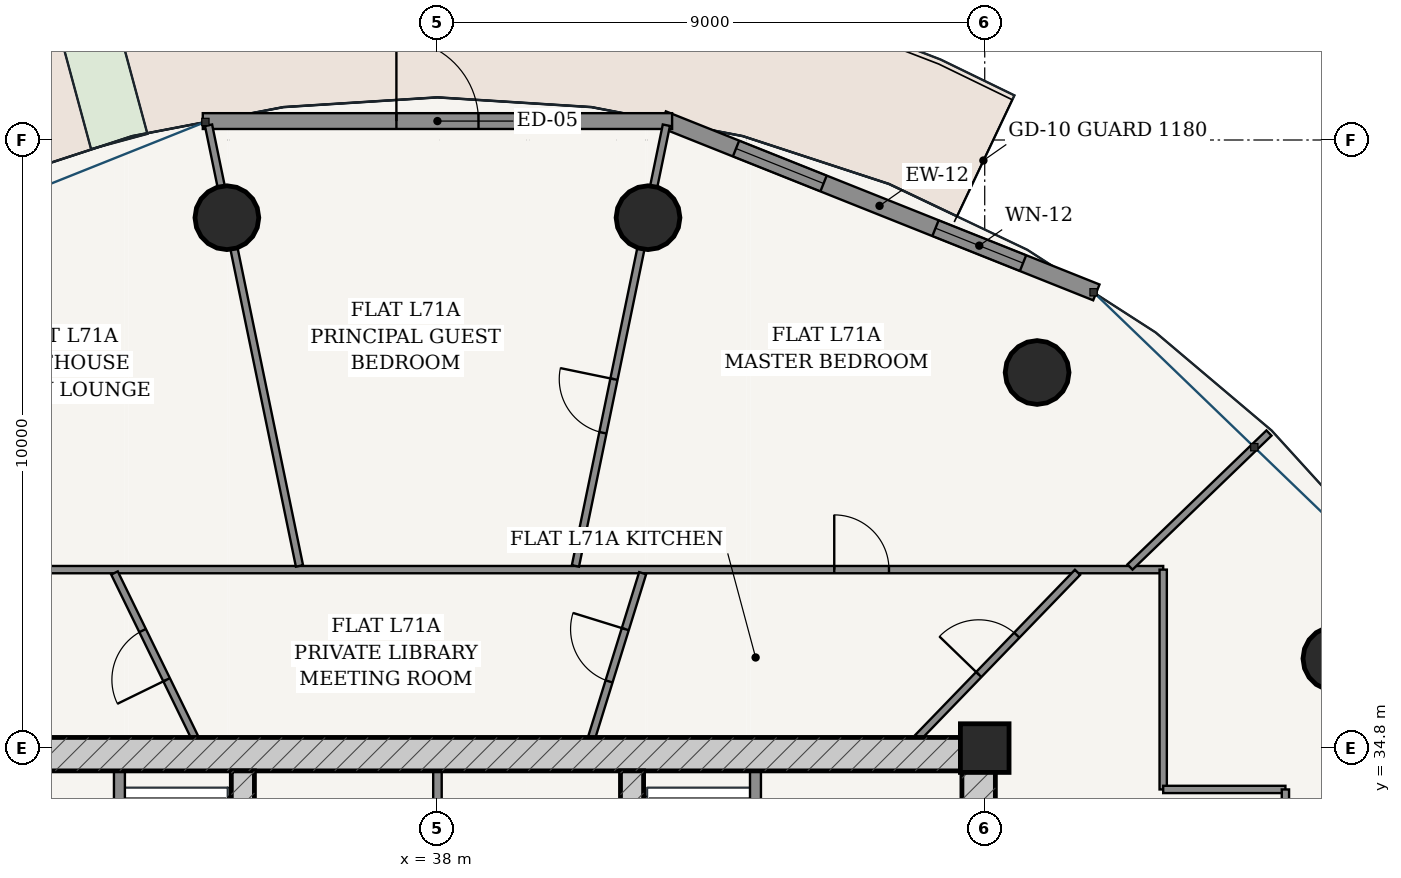
"""IFC4 building model, lengths in metres.
Left out: names, types, materials, properties, quantities, classifications, styles, units other than length and angle.
Written with IfcOpenShell. Run it as: python <this file> out.ifc"""

import sys

from ifc_helpers import new_model, si_unit, direction, frame, frame_2d, origin, origin_2d, place, context, subcontext, project, spatial, rectangle, hollow_circle, extrude, source, transform, mapped, element, fill, save


model = new_model("IFC4")
c1 = context("Model", 3, precision=1e-05, world=origin(), true_north=direction((-0.2419218956, 0.970295726276)))
c2 = subcontext(c1, "Body", "Model", "MODEL_VIEW")
j1 = project(units=[si_unit("LENGTHUNIT", "METRE"), si_unit("PLANEANGLEUNIT", "RADIAN")], contexts=[c1])
p1 = place(None, origin())
s1 = spatial("IfcSite", under=j1, at=p1, CompositionType="ELEMENT")
p2 = place(p1, origin())
s2 = spatial("IfcBuilding", under=s1, at=p2, CompositionType="ELEMENT")
p3 = place(p2, frame((0.0, 0.0, 270.7)))
s3 = spatial("IfcBuildingStorey", under=s2, at=p3, CompositionType="ELEMENT", Elevation=270.7)
p4 = place(p3, frame((47.0, 34.8, 0.0), z_axis=(0.0, 0.0, 1.0), x_axis=(1.0, 0.0, 0.0)))
e1 = element("IfcColumn", 1, at=p4, inside=s3, PredefinedType="COLUMN", context=c2, shape_type="SweptSolid", body=[
    extrude(rectangle(XDim=0.8, YDim=0.8, at=origin_2d()), origin(), (0.0, 0.0, 1.0), 3.75),
])
p5 = place(p3, frame((28.825, 34.7, 0.0), z_axis=(0.0, 0.0, 1.0), x_axis=(1.0, 0.0, 0.0)))
e2 = element("IfcWall", 2, at=p5, inside=s3, PredefinedType="SHEAR", context=c2, shape_type="SweptSolid", body=[
    extrude(rectangle(XDim=18.35, YDim=0.55, at=frame_2d((9.175, 0.0))), origin(), (0.0, 0.0, 1.0), 3.49),
])
p6 = place(p3, frame((46.9, 19.175, 0.0), z_axis=(0.0, 0.0, 1.0), x_axis=(0.0, 1.0, 0.0)))
e3 = element("IfcWall", 3, at=p6, inside=s3, PredefinedType="SHEAR", context=c2, shape_type="SweptSolid", body=[
    extrude(rectangle(XDim=15.25, YDim=0.55, at=frame_2d((7.625, 0.0))), origin(), (0.0, 0.0, 1.0), 3.49),
])
p7 = place(p6, frame((9.875, 0.0, 0.0)))
e4 = element("IfcOpeningElement", 4, at=p7, cuts=e3, PredefinedType="OPENING", context=c2, shape_type="SweptSolid", body=[
    extrude(rectangle(XDim=1.5, YDim=2.2, at=frame_2d((0.75, 1.1))), frame((0.0, 0.285, 0.0), z_axis=(0.0, -1.0, 0.0), x_axis=(1.0, 0.0, 0.0)), (0.0, 0.0, 1.0), 0.57),
])
p8 = place(p3, frame((34.8, 19.175, 0.0), z_axis=(0.0, 0.0, 1.0), x_axis=(0.0, 1.0, 0.0)))
e5 = element("IfcWall", 5, at=p8, inside=s3, PredefinedType="SHEAR", context=c2, shape_type="SweptSolid", body=[
    extrude(rectangle(XDim=15.25, YDim=0.38, at=frame_2d((7.625, 0.0))), origin(), (0.0, 0.0, 1.0), 3.49),
])
p9 = place(p8, frame((7.8, 0.0, 0.0)))
e6 = element("IfcOpeningElement", 6, at=p9, cuts=e5, PredefinedType="OPENING", context=c2, shape_type="SweptSolid", body=[
    extrude(rectangle(XDim=1.05, YDim=2.15, at=frame_2d((0.525, 1.075))), frame((0.0, 0.2, 0.0), z_axis=(0.0, -1.0, 0.0), x_axis=(1.0, 0.0, 0.0)), (0.0, 0.0, 1.0), 0.4),
])
p10 = place(p3, frame((41.2, 19.175, 0.0), z_axis=(0.0, 0.0, 1.0), x_axis=(0.0, 1.0, 0.0)))
e7 = element("IfcWall", 7, at=p10, inside=s3, PredefinedType="SHEAR", context=c2, shape_type="SweptSolid", body=[
    extrude(rectangle(XDim=15.25, YDim=0.38, at=frame_2d((7.625, 0.0))), origin(), (0.0, 0.0, 1.0), 3.49),
])
p11 = place(p10, frame((7.8, 0.0, 0.0)))
e8 = element("IfcOpeningElement", 8, at=p11, cuts=e7, PredefinedType="OPENING", context=c2, shape_type="SweptSolid", body=[
    extrude(rectangle(XDim=1.05, YDim=2.15, at=frame_2d((0.525, 1.075))), frame((0.0, 0.2, 0.0), z_axis=(0.0, -1.0, 0.0), x_axis=(1.0, 0.0, 0.0)), (0.0, 0.0, 1.0), 0.4),
])
for number, where, z_axis, x_axis in (
    (9, (52.759, 36.272, 0.0), (0.0, 0.0, 1.0), (1.0, 0.0, 0.0)),
    (10, (47.861, 40.977, 0.0), (0.0, 0.0, 1.0), (1.0, 0.0, 0.0)),
    (11, (41.463, 43.522, 0.0), (0.0, 0.0, 1.0), (1.0, 0.0, 0.0)),
    (12, (34.537, 43.522, 0.0), (0.0, 0.0, 1.0), (1.0, 0.0, 0.0)),
):
    element("IfcColumn", number, at=place(p3, frame(where, z_axis=z_axis, x_axis=x_axis)), inside=s3, PredefinedType="COLUMN", context=c2, shape_type="SweptSolid", body=[
        extrude(hollow_circle(Radius=0.525, WallThickness=0.035, at=origin_2d()), origin(), (0.0, 0.0, 1.0), 3.75),
    ])
p12 = place(p3, frame((48.836, 42.294, 0.0), z_axis=(0.0, 0.0, 1.0), x_axis=(-0.928724272392, 0.370771123296, 0.0)))
e13 = element("IfcWall", 13, at=p12, inside=s3, PredefinedType="SOLIDWALL", context=c2, shape_type="SweptSolid", body=[
    extrude(rectangle(XDim=7.678, YDim=0.28, at=frame_2d((3.839, 0.0))), origin(), (0.0, 0.0, 1.0), 3.49),
])
p13 = place(p12, frame((1.298, 0.0, 0.85)))
e14 = element("IfcOpeningElement", 14, at=p13, cuts=e13, PredefinedType="OPENING", context=c2, shape_type="SweptSolid", body=[
    extrude(rectangle(XDim=1.55, YDim=1.95, at=frame_2d((0.775, 0.975))), frame((0.0, 0.15, 0.0), z_axis=(0.0, -1.0, 0.0), x_axis=(1.0, 0.0, 0.0)), (0.0, 0.0, 1.0), 0.3),
])
p14 = place(p12, frame((4.83, 0.0, 0.85)))
e15 = element("IfcOpeningElement", 15, at=p14, cuts=e13, PredefinedType="OPENING", context=c2, shape_type="SweptSolid", body=[
    extrude(rectangle(XDim=1.55, YDim=1.95, at=frame_2d((0.775, 0.975))), frame((0.0, 0.15, 0.0), z_axis=(0.0, -1.0, 0.0), x_axis=(1.0, 0.0, 0.0)), (0.0, 0.0, 1.0), 0.3),
])
p15 = place(p3, frame((41.859, 45.111, 0.0), z_axis=(0.0, 0.0, 1.0), x_axis=(-1.0, 0.0, 0.0)))
e16 = element("IfcWall", 16, at=p15, inside=s3, PredefinedType="SOLIDWALL", context=c2, shape_type="SweptSolid", body=[
    extrude(rectangle(XDim=7.718, YDim=0.26, at=frame_2d((3.859, 0.0))), origin(), (0.0, 0.0, 1.0), 3.49),
])
p16 = place(p15, frame((3.184, 0.0, 0.0)))
e17 = element("IfcOpeningElement", 17, at=p16, cuts=e16, PredefinedType="OPENING", context=c2, shape_type="SweptSolid", body=[
    extrude(rectangle(XDim=1.35, YDim=2.2, at=frame_2d((0.675, 1.1))), frame((0.0, 0.14, 0.0), z_axis=(0.0, -1.0, 0.0), x_axis=(1.0, 0.0, 0.0)), (0.0, 0.0, 1.0), 0.28),
])
p17 = place(p3, frame((32.77, 28.52, 0.0), z_axis=(0.0, 0.0, 1.0), x_axis=(0.0, 1.0, 0.0)))
e18 = element("IfcWall", 18, at=p17, inside=s3, PredefinedType="PARTITIONING", context=c2, shape_type="SweptSolid", body=[
    extrude(rectangle(XDim=5.905, YDim=0.18, at=frame_2d((2.953, 0.0))), origin(), (0.0, 0.0, 1.0), 3.49),
])
p18 = place(p17, frame((3.655, 0.0, 0.0)))
e19 = element("IfcOpeningElement", 19, at=p18, cuts=e18, PredefinedType="OPENING", context=c2, shape_type="SweptSolid", body=[
    extrude(rectangle(XDim=1.15, YDim=2.2, at=frame_2d((0.575, 1.1))), frame((0.0, 0.1, 0.0), z_axis=(0.0, -1.0, 0.0), x_axis=(1.0, 0.0, 0.0)), (0.0, 0.0, 1.0), 0.2),
])
p19 = place(p17, frame((0.73, 0.0, 0.0)))
e20 = element("IfcOpeningElement", 20, at=p19, cuts=e18, PredefinedType="OPENING", context=c2, shape_type="SweptSolid", body=[
    extrude(rectangle(XDim=1.2, YDim=2.25, at=frame_2d((0.6, 1.125))), frame((0.0, 0.1, 0.0), z_axis=(0.0, -1.0, 0.0), x_axis=(1.0, 0.0, 0.0)), (0.0, 0.0, 1.0), 0.2),
])
p20 = place(p3, frame((43.23, 28.52, 0.0), z_axis=(0.0, 0.0, 1.0), x_axis=(0.0, 1.0, 0.0)))
e21 = element("IfcWall", 21, at=p20, inside=s3, PredefinedType="PARTITIONING", context=c2, shape_type="SweptSolid", body=[
    extrude(rectangle(XDim=5.905, YDim=0.18, at=frame_2d((2.953, 0.0))), origin(), (0.0, 0.0, 1.0), 3.49),
])
p21 = place(p20, frame((0.905, 0.0, 0.0)))
e22 = element("IfcOpeningElement", 22, at=p21, cuts=e21, PredefinedType="OPENING", context=c2, shape_type="SweptSolid", body=[
    extrude(rectangle(XDim=0.85, YDim=2.1, at=frame_2d((0.425, 1.05))), frame((0.0, 0.1, 0.0), z_axis=(0.0, -1.0, 0.0), x_axis=(1.0, 0.0, 0.0)), (0.0, 0.0, 1.0), 0.2),
])
p22 = place(p20, frame((3.655, 0.0, 0.0)))
e23 = element("IfcOpeningElement", 23, at=p22, cuts=e21, PredefinedType="OPENING", context=c2, shape_type="SweptSolid", body=[
    extrude(rectangle(XDim=1.15, YDim=2.2, at=frame_2d((0.575, 1.1))), frame((0.0, 0.1, 0.0), z_axis=(0.0, -1.0, 0.0), x_axis=(1.0, 0.0, 0.0)), (0.0, 0.0, 1.0), 0.2),
])
p23 = place(p3, frame((38.0, 28.56, 0.0), z_axis=(0.0, 0.0, 1.0), x_axis=(0.0, 1.0, 0.0)))
e24 = element("IfcWall", 24, at=p23, inside=s3, PredefinedType="PARTITIONING", context=c2, shape_type="SweptSolid", body=[
    extrude(rectangle(XDim=5.865, YDim=0.14, at=frame_2d((2.933, 0.0))), origin(), (0.0, 0.0, 1.0), 3.49),
])
p24 = place(p3, frame((26.065, 37.735, 0.0), z_axis=(0.0, 0.0, 1.0), x_axis=(1.0, 0.0, 0.0)))
e25 = element("IfcWall", 25, at=p24, inside=s3, PredefinedType="PARTITIONING", context=c2, shape_type="SweptSolid", body=[
    extrude(rectangle(XDim=23.87, YDim=0.12, at=frame_2d((11.935, 0.0))), origin(), (0.0, 0.0, 1.0), 3.015),
])
p25 = place(p24, frame((18.46, 0.0, 0.0)))
e26 = element("IfcOpeningElement", 26, at=p25, cuts=e25, PredefinedType="OPENING", context=c2, shape_type="SweptSolid", body=[
    extrude(rectangle(XDim=0.9, YDim=2.15, at=frame_2d((0.45, 1.075))), frame((0.0, 0.07, 0.0), z_axis=(0.0, -1.0, 0.0), x_axis=(1.0, 0.0, 0.0)), (0.0, 0.0, 1.0), 0.14),
])
p26 = place(p24, frame((3.144, 0.0, 0.0)))
e27 = element("IfcOpeningElement", 27, at=p26, cuts=e25, PredefinedType="OPENING", context=c2, shape_type="SweptSolid", body=[
    extrude(rectangle(XDim=0.9, YDim=2.15, at=frame_2d((0.45, 1.075))), frame((0.0, 0.07, 0.0), z_axis=(0.0, -1.0, 0.0), x_axis=(1.0, 0.0, 0.0)), (0.0, 0.0, 1.0), 0.14),
])
p27 = place(p3, frame((49.935, 37.735, 0.0), z_axis=(0.0, 0.0, 1.0), x_axis=(0.0, -1.0, 0.0)))
e28 = element("IfcWall", 28, at=p27, inside=s3, PredefinedType="PARTITIONING", context=c2, shape_type="SweptSolid", body=[
    extrude(rectangle(XDim=3.615, YDim=0.12, at=frame_2d((1.808, 0.0))), origin(), (0.0, 0.0, 1.0), 3.015),
])
p28 = place(p3, frame((49.935, 34.12, 0.0), z_axis=(0.0, 0.0, 1.0), x_axis=(1.0, 0.0, 0.0)))
e29 = element("IfcWall", 29, at=p28, inside=s3, PredefinedType="PARTITIONING", context=c2, shape_type="SweptSolid", body=[
    extrude(rectangle(XDim=2.01, YDim=0.12, at=frame_2d((1.005, 0.0))), origin(), (0.0, 0.0, 1.0), 3.209),
])
p29 = place(p3, frame((51.945, 34.12, 0.0), z_axis=(0.0, 0.0, 1.0), x_axis=(0.0, -1.0, 0.0)))
e30 = element("IfcWall", 30, at=p29, inside=s3, PredefinedType="PARTITIONING", context=c2, shape_type="SweptSolid", body=[
    extrude(rectangle(XDim=12.786, YDim=0.12, at=frame_2d((6.393, 0.0))), origin(), (0.0, 0.0, 1.0), 3.015),
])
p30 = place(p29, frame((2.562, 0.0, 0.0)))
e31 = element("IfcOpeningElement", 31, at=p30, cuts=e30, PredefinedType="OPENING", context=c2, shape_type="SweptSolid", body=[
    extrude(rectangle(XDim=0.9, YDim=2.15, at=frame_2d((0.45, 1.075))), frame((0.0, 0.07, 0.0), z_axis=(0.0, -1.0, 0.0), x_axis=(1.0, 0.0, 0.0)), (0.0, 0.0, 1.0), 0.14),
])
p31 = place(p3, frame((49.389, 37.778, 0.0), z_axis=(0.0, 0.0, 1.0), x_axis=(0.719985652574, 0.693988948102, 0.0)))
e32 = element("IfcWall", 32, at=p31, inside=s3, PredefinedType="PARTITIONING", context=c2, shape_type="SweptSolid", body=[
    extrude(rectangle(XDim=3.174, YDim=0.12, at=frame_2d((1.587, 0.0))), origin(), (0.0, 0.0, 1.0), 3.121),
])
p32 = place(p3, frame((40.269, 37.796, 0.0), z_axis=(0.0, 0.0, 1.0), x_axis=(0.202101574245, 0.979364566281, 0.0)))
e33 = element("IfcWall", 33, at=p32, inside=s3, PredefinedType="PARTITIONING", context=c2, shape_type="SweptSolid", body=[
    extrude(rectangle(XDim=7.4, YDim=0.12, at=frame_2d((3.7, 0.0))), origin(), (0.0, 0.0, 1.0), 3.015),
])
p33 = place(p32, frame((2.236, 0.0, 0.0)))
e34 = element("IfcOpeningElement", 34, at=p33, cuts=e33, PredefinedType="OPENING", context=c2, shape_type="SweptSolid", body=[
    extrude(rectangle(XDim=0.9, YDim=2.15, at=frame_2d((0.45, 1.075))), frame((0.0, 0.07, 0.0), z_axis=(0.0, -1.0, 0.0), x_axis=(1.0, 0.0, 0.0)), (0.0, 0.0, 1.0), 0.14),
])
p34 = place(p3, frame((35.731, 37.796, 0.0), z_axis=(0.0, 0.0, 1.0), x_axis=(-0.202101574245, 0.979364566281, 0.0)))
e35 = element("IfcWall", 35, at=p34, inside=s3, PredefinedType="PARTITIONING", context=c2, shape_type="SweptSolid", body=[
    extrude(rectangle(XDim=7.4, YDim=0.12, at=frame_2d((3.7, 0.0))), origin(), (0.0, 0.0, 1.0), 3.015),
])
p35 = place(p3, frame((45.903, 34.976, 0.0), z_axis=(0.0, 0.0, 1.0), x_axis=(0.69497417129, 0.719034700999, 0.0)))
e36 = element("IfcWall", 36, at=p35, inside=s3, PredefinedType="PARTITIONING", context=c2, shape_type="SweptSolid", body=[
    extrude(rectangle(XDim=3.775, YDim=0.12, at=frame_2d((1.887, 0.0))), origin(), (0.0, 0.0, 1.0), 3.015),
])
p36 = place(p35, frame((1.437, 0.0, 0.0)))
e37 = element("IfcOpeningElement", 37, at=p36, cuts=e36, PredefinedType="OPENING", context=c2, shape_type="SweptSolid", body=[
    extrude(rectangle(XDim=0.9, YDim=2.15, at=frame_2d((0.45, 1.075))), frame((0.0, 0.07, 0.0), z_axis=(0.0, -1.0, 0.0), x_axis=(1.0, 0.0, 0.0)), (0.0, 0.0, 1.0), 0.14),
])
p37 = place(p3, frame((40.537, 34.977, 0.0), z_axis=(0.0, 0.0, 1.0), x_axis=(0.29633127961, 0.95508521752, 0.0)))
e38 = element("IfcWall", 38, at=p37, inside=s3, PredefinedType="PARTITIONING", context=c2, shape_type="SweptSolid", body=[
    extrude(rectangle(XDim=2.826, YDim=0.12, at=frame_2d((1.413, 0.0))), origin(), (0.0, 0.0, 1.0), 2.575),
])
p38 = place(p37, frame((0.963, 0.0, 0.0)))
e39 = element("IfcOpeningElement", 39, at=p38, cuts=e38, PredefinedType="OPENING", context=c2, shape_type="SweptSolid", body=[
    extrude(rectangle(XDim=0.9, YDim=2.15, at=frame_2d((0.45, 1.075))), frame((0.0, 0.07, 0.0), z_axis=(0.0, -1.0, 0.0), x_axis=(1.0, 0.0, 0.0)), (0.0, 0.0, 1.0), 0.14),
])
p39 = place(p3, frame((34.008, 34.977, 0.0), z_axis=(0.0, 0.0, 1.0), x_axis=(-0.438717914863, 0.898624833386, 0.0)))
e40 = element("IfcWall", 40, at=p39, inside=s3, PredefinedType="PARTITIONING", context=c2, shape_type="SweptSolid", body=[
    extrude(rectangle(XDim=3.007, YDim=0.12, at=frame_2d((1.504, 0.0))), origin(), (0.0, 0.0, 1.0), 3.49),
])
p40 = place(p39, frame((1.054, 0.0, 0.0)))
e41 = element("IfcOpeningElement", 41, at=p40, cuts=e40, PredefinedType="OPENING", context=c2, shape_type="SweptSolid", body=[
    extrude(rectangle(XDim=0.9, YDim=2.15, at=frame_2d((0.45, 1.075))), frame((0.0, 0.07, 0.0), z_axis=(0.0, -1.0, 0.0), x_axis=(1.0, 0.0, 0.0)), (0.0, 0.0, 1.0), 0.14),
])
m1 = source(origin(), c2, "Body", "SweptSolid", [
    extrude(rectangle(XDim=1.55, YDim=1.95, at=frame_2d((0.775, 0.975))), frame((0.0, 0.03, 0.0), z_axis=(0.0, -1.0, 0.0), x_axis=(1.0, 0.0, 0.0)), (0.0, 0.0, 1.0), 0.06),
])
p41 = place(p13, origin())
e42 = element("IfcWindow", 42, at=p41, inside=s3, PartitioningType="SINGLE_PANEL", PredefinedType="WINDOW", context=c2, shape_type="MappedRepresentation", body=[
    mapped(m1, transform((0.0, 0.0, 0.0), scale=1.0)),
])
fill(e14, e42)
p42 = place(p14, origin())
e43 = element("IfcWindow", 43, at=p42, inside=s3, PartitioningType="SINGLE_PANEL", PredefinedType="WINDOW", context=c2, shape_type="MappedRepresentation", body=[
    mapped(m1, transform((0.0, 0.0, 0.0), scale=1.0)),
])
fill(e15, e43)
m2 = source(origin(), c2, "Body", "SweptSolid", [
    extrude(rectangle(XDim=1.35, YDim=2.2, at=frame_2d((0.675, 1.1))), frame((0.0, 0.025, 0.0), z_axis=(0.0, -1.0, 0.0), x_axis=(1.0, 0.0, 0.0)), (0.0, 0.0, 1.0), 0.05),
])
p43 = place(p16, frame((1.35, 0.0, 0.0), z_axis=(0.0, 0.0, 1.0), x_axis=(-1.0, 0.0, 0.0)))
e44 = element("IfcDoor", 44, at=p43, inside=s3, OperationType="SINGLE_SWING_LEFT", PredefinedType="DOOR", context=c2, shape_type="MappedRepresentation", body=[
    mapped(m2, transform((0.0, 0.0, 0.0), scale=1.0)),
])
fill(e17, e44)
m3 = source(origin(), c2, "Body", "SweptSolid", [
    extrude(rectangle(XDim=0.9, YDim=2.15, at=frame_2d((0.45, 1.075))), frame((0.0, 0.025, 0.0), z_axis=(0.0, -1.0, 0.0), x_axis=(1.0, 0.0, 0.0)), (0.0, 0.0, 1.0), 0.05),
])
p44 = place(p36, origin())
e45 = element("IfcDoor", 45, at=p44, inside=s3, OperationType="SINGLE_SWING_LEFT", PredefinedType="DOOR", context=c2, shape_type="MappedRepresentation", body=[
    mapped(m3, transform((0.0, 0.0, 0.0), scale=1.0)),
])
fill(e37, e45)
p45 = place(p38, origin())
e46 = element("IfcDoor", 46, at=p45, inside=s3, OperationType="SINGLE_SWING_RIGHT", PredefinedType="DOOR", context=c2, shape_type="MappedRepresentation", body=[
    mapped(m3, transform((0.0, 0.0, 0.0), scale=1.0)),
])
fill(e39, e46)
p46 = place(p40, origin())
e47 = element("IfcDoor", 47, at=p46, inside=s3, OperationType="SINGLE_SWING_LEFT", PredefinedType="DOOR", context=c2, shape_type="MappedRepresentation", body=[
    mapped(m3, transform((0.0, 0.0, 0.0), scale=1.0)),
])
fill(e41, e47)
p47 = place(p25, origin())
e48 = element("IfcDoor", 48, at=p47, inside=s3, OperationType="SINGLE_SWING_LEFT", PredefinedType="DOOR", context=c2, shape_type="MappedRepresentation", body=[
    mapped(m3, transform((0.0, 0.0, 0.0), scale=1.0)),
])
fill(e26, e48)
p48 = place(p33, origin())
e49 = element("IfcDoor", 49, at=p48, inside=s3, OperationType="SINGLE_SWING_RIGHT", PredefinedType="DOOR", context=c2, shape_type="MappedRepresentation", body=[
    mapped(m3, transform((0.0, 0.0, 0.0), scale=1.0)),
])
fill(e34, e49)
save(model, sys.argv[1])
